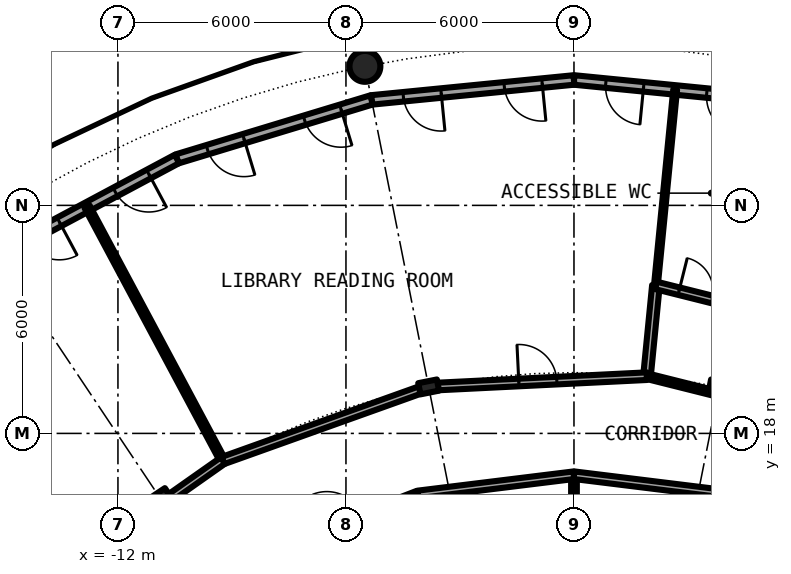
"""IFC4 building model, lengths in metres.
Left out: names, types, materials, properties, quantities, classifications, styles, units other than length and angle.
Written with IfcOpenShell. Run it as: python <this file> out.ifc"""

import sys

from ifc_helpers import new_model, si_unit, direction, frame, frame_2d, origin, origin_2d, place, context, subcontext, project, spatial, rectangle, hollow_circle, i_section, extrude, element, fill, save


model = new_model("IFC4")
c1 = context("Model", 3, precision=1e-05, world=origin(), true_north=direction((0.0, 1.0)))
c2 = subcontext(c1, "Body", "Model", "MODEL_VIEW")
j1 = project(units=[si_unit("LENGTHUNIT", "METRE"), si_unit("PLANEANGLEUNIT", "RADIAN")], contexts=[c1])
p1 = place(None, origin())
s1 = spatial("IfcSite", under=j1, at=p1, CompositionType="ELEMENT")
p2 = place(p1, origin())
s2 = spatial("IfcBuilding", under=s1, at=p2, CompositionType="ELEMENT")
p3 = place(p2, frame((0.0, 0.0, 157.4)))
s3 = spatial("IfcBuildingStorey", under=s2, at=p3, CompositionType="ELEMENT", Elevation=157.4)
p4 = place(p3, frame((-5.501, 27.658, 0.0), z_axis=(0.0, 0.0, 1.0), x_axis=(1.0, 0.0, 0.0)))
e1 = element("IfcColumn", 1, at=p4, inside=s3, PredefinedType="COLUMN", context=c2, shape_type="SweptSolid", body=[
    extrude(hollow_circle(Radius=0.406, WallThickness=0.04, at=origin_2d()), origin(), (0.0, 0.0, 1.0), 4.2),
])
for number, where, z_axis, x_axis in (
    (2, (3.824, 19.223, 0.0), (0.0, 0.0, 1.0), (0.195, 0.981, 0.0)),
    (3, (-3.824, 19.223, 0.0), (0.0, 0.0, 1.0), (-0.195, 0.981, 0.0)),
    (4, (-10.889, 16.297, 0.0), (0.0, 0.0, 1.0), (-0.556, 0.831, 0.0)),
):
    element("IfcColumn", number, at=place(p3, frame(where, z_axis=z_axis, x_axis=x_axis)), inside=s3, PredefinedType="COLUMN", context=c2, shape_type="SweptSolid", body=[
        extrude(i_section(OverallWidth=0.3, OverallDepth=0.5, WebThickness=0.014, FlangeThickness=0.028, FilletRadius=0.027, at=origin_2d()), origin(), (0.0, 0.0, 1.0), 4.2),
    ])
p5 = place(p3, frame((5.326, 26.775, 0.0), z_axis=(0.0, 0.0, 1.0), x_axis=(-0.995173996315, 0.098126026407, 0.0)))
e5 = element("IfcWall", 5, at=p5, inside=s3, PredefinedType="SOLIDWALL", context=c2, shape_type="SweptSolid", body=[
    extrude(rectangle(XDim=5.352, YDim=0.25, at=frame_2d((2.676, 0.0))), origin(), (0.0, 0.0, 1.0), 3.85),
])
p6 = place(p5, frame((0.841, 0.0, 0.0)))
e6 = element("IfcOpeningElement", 6, at=p6, cuts=e5, PredefinedType="OPENING", context=c2, shape_type="SweptSolid", body=[
    extrude(rectangle(XDim=1.0, YDim=2.2, at=frame_2d((0.5, 1.1))), frame((0.0, 0.135, 0.0), z_axis=(0.0, -1.0, 0.0), x_axis=(1.0, 0.0, 0.0)), (0.0, 0.0, 1.0), 0.27),
])
p7 = place(p5, frame((3.51, 0.0, 0.0)))
e7 = element("IfcOpeningElement", 7, at=p7, cuts=e5, PredefinedType="OPENING", context=c2, shape_type="SweptSolid", body=[
    extrude(rectangle(XDim=1.0, YDim=2.2, at=frame_2d((0.5, 1.1))), frame((0.0, 0.135, 0.0), z_axis=(0.0, -1.0, 0.0), x_axis=(1.0, 0.0, 0.0)), (0.0, 0.0, 1.0), 0.27),
])
p8 = place(p3, frame((0.0, 27.3, 0.0), z_axis=(0.0, 0.0, 1.0), x_axis=(-0.995173996315, -0.098126026407, 0.0)))
e8 = element("IfcWall", 8, at=p8, inside=s3, PredefinedType="SOLIDWALL", context=c2, shape_type="SweptSolid", body=[
    extrude(rectangle(XDim=5.352, YDim=0.25, at=frame_2d((2.676, 0.0))), origin(), (0.0, 0.0, 1.0), 3.85),
])
p9 = place(p8, frame((0.841, 0.0, 0.0)))
e9 = element("IfcOpeningElement", 9, at=p9, cuts=e8, PredefinedType="OPENING", context=c2, shape_type="SweptSolid", body=[
    extrude(rectangle(XDim=1.0, YDim=2.2, at=frame_2d((0.5, 1.1))), frame((0.0, 0.135, 0.0), z_axis=(0.0, -1.0, 0.0), x_axis=(1.0, 0.0, 0.0)), (0.0, 0.0, 1.0), 0.27),
])
p10 = place(p8, frame((3.51, 0.0, 0.0)))
e10 = element("IfcOpeningElement", 10, at=p10, cuts=e8, PredefinedType="OPENING", context=c2, shape_type="SweptSolid", body=[
    extrude(rectangle(XDim=1.0, YDim=2.2, at=frame_2d((0.5, 1.1))), frame((0.0, 0.135, 0.0), z_axis=(0.0, -1.0, 0.0), x_axis=(1.0, 0.0, 0.0)), (0.0, 0.0, 1.0), 0.27),
])
p11 = place(p3, frame((-5.326, 26.775, 0.0), z_axis=(0.0, 0.0, 1.0), x_axis=(-0.956965678721, -0.290201119486, 0.0)))
e11 = element("IfcWall", 11, at=p11, inside=s3, PredefinedType="SOLIDWALL", context=c2, shape_type="SweptSolid", body=[
    extrude(rectangle(XDim=5.351, YDim=0.25, at=frame_2d((2.676, 0.0))), origin(), (0.0, 0.0, 1.0), 3.85),
])
p12 = place(p11, frame((0.841, 0.0, 0.0)))
e12 = element("IfcOpeningElement", 12, at=p12, cuts=e11, PredefinedType="OPENING", context=c2, shape_type="SweptSolid", body=[
    extrude(rectangle(XDim=1.0, YDim=2.2, at=frame_2d((0.5, 1.1))), frame((0.0, 0.135, 0.0), z_axis=(0.0, -1.0, 0.0), x_axis=(1.0, 0.0, 0.0)), (0.0, 0.0, 1.0), 0.27),
])
p13 = place(p11, frame((3.51, 0.0, 0.0)))
e13 = element("IfcOpeningElement", 13, at=p13, cuts=e11, PredefinedType="OPENING", context=c2, shape_type="SweptSolid", body=[
    extrude(rectangle(XDim=1.0, YDim=2.2, at=frame_2d((0.5, 1.1))), frame((0.0, 0.135, 0.0), z_axis=(0.0, -1.0, 0.0), x_axis=(1.0, 0.0, 0.0)), (0.0, 0.0, 1.0), 0.27),
])
p14 = place(p3, frame((-10.447, 25.222, 0.0), z_axis=(0.0, 0.0, 1.0), x_axis=(-0.881915646801, -0.471407246368, 0.0)))
e14 = element("IfcWall", 14, at=p14, inside=s3, PredefinedType="SOLIDWALL", context=c2, shape_type="SweptSolid", body=[
    extrude(rectangle(XDim=5.352, YDim=0.25, at=frame_2d((2.676, 0.0))), origin(), (0.0, 0.0, 1.0), 3.85),
])
p15 = place(p14, frame((0.841, 0.0, 0.0)))
e15 = element("IfcOpeningElement", 15, at=p15, cuts=e14, PredefinedType="OPENING", context=c2, shape_type="SweptSolid", body=[
    extrude(rectangle(XDim=1.0, YDim=2.2, at=frame_2d((0.5, 1.1))), frame((0.0, 0.135, 0.0), z_axis=(0.0, -1.0, 0.0), x_axis=(1.0, 0.0, 0.0)), (0.0, 0.0, 1.0), 0.27),
])
p16 = place(p14, frame((3.51, 0.0, 0.0)))
e16 = element("IfcOpeningElement", 16, at=p16, cuts=e14, PredefinedType="OPENING", context=c2, shape_type="SweptSolid", body=[
    extrude(rectangle(XDim=1.0, YDim=2.2, at=frame_2d((0.5, 1.1))), frame((0.0, 0.135, 0.0), z_axis=(0.0, -1.0, 0.0), x_axis=(1.0, 0.0, 0.0)), (0.0, 0.0, 1.0), 0.27),
])
p17 = place(p3, frame((-12.812, 23.965, 0.0), z_axis=(0.0, 0.0, 1.0), x_axis=(0.471439510802, -0.881898399848, 0.0)))
e17 = element("IfcWall", 17, at=p17, inside=s3, PredefinedType="PARTITIONING", context=c2, shape_type="SweptSolid", body=[
    extrude(rectangle(XDim=7.575, YDim=0.15, at=frame_2d((3.787, 0.0))), origin(), (0.0, 0.0, 1.0), 3.85),
])
p18 = place(p3, frame((0.0, 7.72, 0.0), z_axis=(0.0, 0.0, 1.0), x_axis=(0.0, 1.0, 0.0)))
e18 = element("IfcWall", 18, at=p18, inside=s3, PredefinedType="PARTITIONING", context=c2, shape_type="SweptSolid", body=[
    extrude(rectangle(XDim=9.18, YDim=0.15, at=frame_2d((4.59, 0.0))), origin(), (0.0, 0.0, 1.0), 3.85),
])
p19 = place(p3, frame((1.921, 19.506, 0.0), z_axis=(0.0, 0.0, 1.0), x_axis=(0.097982433599, 0.995188144376, 0.0)))
e19 = element("IfcWall", 19, at=p19, inside=s3, PredefinedType="PARTITIONING", context=c2, shape_type="SweptSolid", body=[
    extrude(rectangle(XDim=2.399, YDim=0.2, at=frame_2d((1.2, 0.0))), origin(), (0.0, 0.0, 1.0), 3.85),
])
p20 = place(p3, frame((2.156, 21.894, 0.0), z_axis=(0.0, 0.0, 1.0), x_axis=(0.097990148768, 0.995187384739, 0.0)))
e20 = element("IfcWall", 20, at=p20, inside=s3, PredefinedType="PARTITIONING", context=c2, shape_type="SweptSolid", body=[
    extrude(rectangle(XDim=5.175, YDim=0.1, at=frame_2d((2.587, 0.0))), origin(), (0.0, 0.0, 1.0), 3.85),
])
p21 = place(p3, frame((-7.967, 14.904, 0.0), z_axis=(0.0, 0.0, 1.0), x_axis=(0.932943640288, 0.360022449363, 0.0)))
e21 = element("IfcWall", 21, at=p21, inside=s3, PredefinedType="PARTITIONING", context=c2, shape_type="SweptSolid", body=[
    extrude(rectangle(XDim=4.139, YDim=0.2, at=frame_2d((2.069, 0.0))), origin(), (0.0, 0.0, 1.0), 3.85),
])
p22 = place(p21, frame((1.569, 0.0, 0.0)))
e22 = element("IfcOpeningElement", 22, at=p22, cuts=e21, PredefinedType="OPENING", context=c2, shape_type="SweptSolid", body=[
    extrude(rectangle(XDim=1.0, YDim=2.3, at=frame_2d((0.5, 1.15))), frame((0.0, 0.11, 0.0), z_axis=(0.0, -1.0, 0.0), x_axis=(1.0, 0.0, 0.0)), (0.0, 0.0, 1.0), 0.22),
])
for number, where, z_axis, x_axis in (
    (23, (-4.106, 16.394, 0.0), (0.0, 0.0, 1.0), (0.992, 0.122, 0.0)),
    (24, (0.0, 16.9, 0.0), (0.0, 0.0, 1.0), (0.992, -0.122, 0.0)),
):
    element("IfcWall", number, at=place(p3, frame(where, z_axis=z_axis, x_axis=x_axis)), inside=s3, PredefinedType="PARTITIONING", context=c2, shape_type="SweptSolid", body=[
        extrude(rectangle(XDim=4.137, YDim=0.2, at=frame_2d((2.068, 0.0))), origin(), (0.0, 0.0, 1.0), 3.85),
    ])
p23 = place(p3, frame((-9.239, 17.286, 0.0), z_axis=(0.0, 0.0, 1.0), x_axis=(0.941550382061, 0.336872198379, 0.0)))
e25 = element("IfcWall", 25, at=p23, inside=s3, PredefinedType="PARTITIONING", context=c2, shape_type="SweptSolid", body=[
    extrude(rectangle(XDim=5.599, YDim=0.2, at=frame_2d((2.8, 0.0))), origin(), (0.0, 0.0, 1.0), 3.54),
])
p24 = place(p3, frame((-3.672, 19.23, 0.0), z_axis=(0.0, 0.0, 1.0), x_axis=(0.998783562084, 0.049309188909, 0.0)))
e26 = element("IfcWall", 26, at=p24, inside=s3, PredefinedType="PARTITIONING", context=c2, shape_type="SweptSolid", body=[
    extrude(rectangle(XDim=5.6, YDim=0.2, at=frame_2d((2.8, 0.0))), origin(), (0.0, 0.0, 1.0), 3.54),
])
p25 = place(p24, frame((2.224, 0.0, 0.0)))
e27 = element("IfcOpeningElement", 27, at=p25, cuts=e26, PredefinedType="OPENING", context=c2, shape_type="SweptSolid", body=[
    extrude(rectangle(XDim=1.0, YDim=2.3, at=frame_2d((0.5, 1.15))), frame((0.0, 0.11, 0.0), z_axis=(0.0, -1.0, 0.0), x_axis=(1.0, 0.0, 0.0)), (0.0, 0.0, 1.0), 0.22),
])
p26 = place(p3, frame((1.921, 19.506, 0.0), z_axis=(0.0, 0.0, 1.0), x_axis=(0.969996560647, -0.243118638391, 0.0)))
e28 = element("IfcWall", 28, at=p26, inside=s3, PredefinedType="PARTITIONING", context=c2, shape_type="SweptSolid", body=[
    extrude(rectangle(XDim=1.773, YDim=0.15, at=frame_2d((0.887, 0.0))), origin(), (0.0, 0.0, 1.0), 3.54),
])
p27 = place(p3, frame((-10.688, 16.266, 0.0), z_axis=(0.0, 0.0, 1.0), x_axis=(0.817772792535, 0.575541188613, 0.0)))
e29 = element("IfcWall", 29, at=p27, inside=s3, PredefinedType="PARTITIONING", context=c2, shape_type="SweptSolid", body=[
    extrude(rectangle(XDim=1.772, YDim=0.2, at=frame_2d((0.886, 0.0))), origin(), (0.0, 0.0, 1.0), 3.54),
])
p28 = place(p3, frame((2.156, 21.894, 0.0), z_axis=(0.0, 0.0, 1.0), x_axis=(0.970020040157, -0.243024940478, 0.0)))
e30 = element("IfcWall", 30, at=p28, inside=s3, PredefinedType="PARTITIONING", context=c2, shape_type="SweptSolid", body=[
    extrude(rectangle(XDim=6.457, YDim=0.2, at=frame_2d((3.228, 0.0))), origin(), (0.0, 0.0, 1.0), 3.85),
])
p29 = place(p28, frame((4.93, 0.0, 0.0)))
e31 = element("IfcOpeningElement", 31, at=p29, cuts=e30, PredefinedType="OPENING", context=c2, shape_type="SweptSolid", body=[
    extrude(rectangle(XDim=0.9, YDim=2.3, at=frame_2d((0.45, 1.15))), frame((0.0, 0.11, 0.0), z_axis=(0.0, -1.0, 0.0), x_axis=(1.0, 0.0, 0.0)), (0.0, 0.0, 1.0), 0.22),
])
p30 = place(p28, frame((2.774, 0.0, 0.0)))
e32 = element("IfcOpeningElement", 32, at=p30, cuts=e30, PredefinedType="OPENING", context=c2, shape_type="SweptSolid", body=[
    extrude(rectangle(XDim=0.9, YDim=2.3, at=frame_2d((0.45, 1.15))), frame((0.0, 0.11, 0.0), z_axis=(0.0, -1.0, 0.0), x_axis=(1.0, 0.0, 0.0)), (0.0, 0.0, 1.0), 0.22),
])
p31 = place(p28, frame((0.625, 0.0, 0.0)))
e33 = element("IfcOpeningElement", 33, at=p31, cuts=e30, PredefinedType="OPENING", context=c2, shape_type="SweptSolid", body=[
    extrude(rectangle(XDim=0.9, YDim=2.3, at=frame_2d((0.45, 1.15))), frame((0.0, 0.11, 0.0), z_axis=(0.0, -1.0, 0.0), x_axis=(1.0, 0.0, 0.0)), (0.0, 0.0, 1.0), 0.22),
])
p32 = place(p6, origin())
e34 = element("IfcDoor", 34, at=p32, inside=s3, OperationType="SINGLE_SWING_LEFT", PredefinedType="DOOR", context=c2, shape_type="SweptSolid", body=[
    extrude(rectangle(XDim=1.0, YDim=2.2, at=frame_2d((0.5, 1.1))), frame((0.0, 0.025, 0.0), z_axis=(0.0, -1.0, 0.0), x_axis=(1.0, 0.0, 0.0)), (0.0, 0.0, 1.0), 0.05),
])
fill(e6, e34)
p33 = place(p7, origin())
e35 = element("IfcDoor", 35, at=p33, inside=s3, OperationType="SINGLE_SWING_LEFT", PredefinedType="DOOR", context=c2, shape_type="SweptSolid", body=[
    extrude(rectangle(XDim=1.0, YDim=2.2, at=frame_2d((0.5, 1.1))), frame((0.0, 0.025, 0.0), z_axis=(0.0, -1.0, 0.0), x_axis=(1.0, 0.0, 0.0)), (0.0, 0.0, 1.0), 0.05),
])
fill(e7, e35)
p34 = place(p9, origin())
e36 = element("IfcDoor", 36, at=p34, inside=s3, OperationType="SINGLE_SWING_LEFT", PredefinedType="DOOR", context=c2, shape_type="SweptSolid", body=[
    extrude(rectangle(XDim=1.0, YDim=2.2, at=frame_2d((0.5, 1.1))), frame((0.0, 0.025, 0.0), z_axis=(0.0, -1.0, 0.0), x_axis=(1.0, 0.0, 0.0)), (0.0, 0.0, 1.0), 0.05),
])
fill(e9, e36)
p35 = place(p10, origin())
e37 = element("IfcDoor", 37, at=p35, inside=s3, OperationType="SINGLE_SWING_LEFT", PredefinedType="DOOR", context=c2, shape_type="SweptSolid", body=[
    extrude(rectangle(XDim=1.0, YDim=2.2, at=frame_2d((0.5, 1.1))), frame((0.0, 0.025, 0.0), z_axis=(0.0, -1.0, 0.0), x_axis=(1.0, 0.0, 0.0)), (0.0, 0.0, 1.0), 0.05),
])
fill(e10, e37)
p36 = place(p12, origin())
e38 = element("IfcDoor", 38, at=p36, inside=s3, OperationType="SINGLE_SWING_LEFT", PredefinedType="DOOR", context=c2, shape_type="SweptSolid", body=[
    extrude(rectangle(XDim=1.0, YDim=2.2, at=frame_2d((0.5, 1.1))), frame((0.0, 0.025, 0.0), z_axis=(0.0, -1.0, 0.0), x_axis=(1.0, 0.0, 0.0)), (0.0, 0.0, 1.0), 0.05),
])
fill(e12, e38)
p37 = place(p13, origin())
e39 = element("IfcDoor", 39, at=p37, inside=s3, OperationType="SINGLE_SWING_LEFT", PredefinedType="DOOR", context=c2, shape_type="SweptSolid", body=[
    extrude(rectangle(XDim=1.0, YDim=2.2, at=frame_2d((0.5, 1.1))), frame((0.0, 0.025, 0.0), z_axis=(0.0, -1.0, 0.0), x_axis=(1.0, 0.0, 0.0)), (0.0, 0.0, 1.0), 0.05),
])
fill(e13, e39)
p38 = place(p15, origin())
e40 = element("IfcDoor", 40, at=p38, inside=s3, OperationType="SINGLE_SWING_LEFT", PredefinedType="DOOR", context=c2, shape_type="SweptSolid", body=[
    extrude(rectangle(XDim=1.0, YDim=2.2, at=frame_2d((0.5, 1.1))), frame((0.0, 0.025, 0.0), z_axis=(0.0, -1.0, 0.0), x_axis=(1.0, 0.0, 0.0)), (0.0, 0.0, 1.0), 0.05),
])
fill(e15, e40)
p39 = place(p16, origin())
e41 = element("IfcDoor", 41, at=p39, inside=s3, OperationType="SINGLE_SWING_LEFT", PredefinedType="DOOR", context=c2, shape_type="SweptSolid", body=[
    extrude(rectangle(XDim=1.0, YDim=2.2, at=frame_2d((0.5, 1.1))), frame((0.0, 0.025, 0.0), z_axis=(0.0, -1.0, 0.0), x_axis=(1.0, 0.0, 0.0)), (0.0, 0.0, 1.0), 0.05),
])
fill(e16, e41)
p40 = place(p31, origin())
e42 = element("IfcDoor", 42, at=p40, inside=s3, OperationType="SINGLE_SWING_LEFT", PredefinedType="DOOR", context=c2, shape_type="SweptSolid", body=[
    extrude(rectangle(XDim=0.9, YDim=2.3, at=frame_2d((0.45, 1.15))), frame((0.0, 0.025, 0.0), z_axis=(0.0, -1.0, 0.0), x_axis=(1.0, 0.0, 0.0)), (0.0, 0.0, 1.0), 0.05),
])
fill(e33, e42)
p41 = place(p25, origin())
e43 = element("IfcDoor", 43, at=p41, inside=s3, OperationType="SINGLE_SWING_LEFT", PredefinedType="DOOR", context=c2, shape_type="SweptSolid", body=[
    extrude(rectangle(XDim=1.0, YDim=2.3, at=frame_2d((0.5, 1.15))), frame((0.0, 0.025, 0.0), z_axis=(0.0, -1.0, 0.0), x_axis=(1.0, 0.0, 0.0)), (0.0, 0.0, 1.0), 0.05),
])
fill(e27, e43)
save(model, sys.argv[1])
